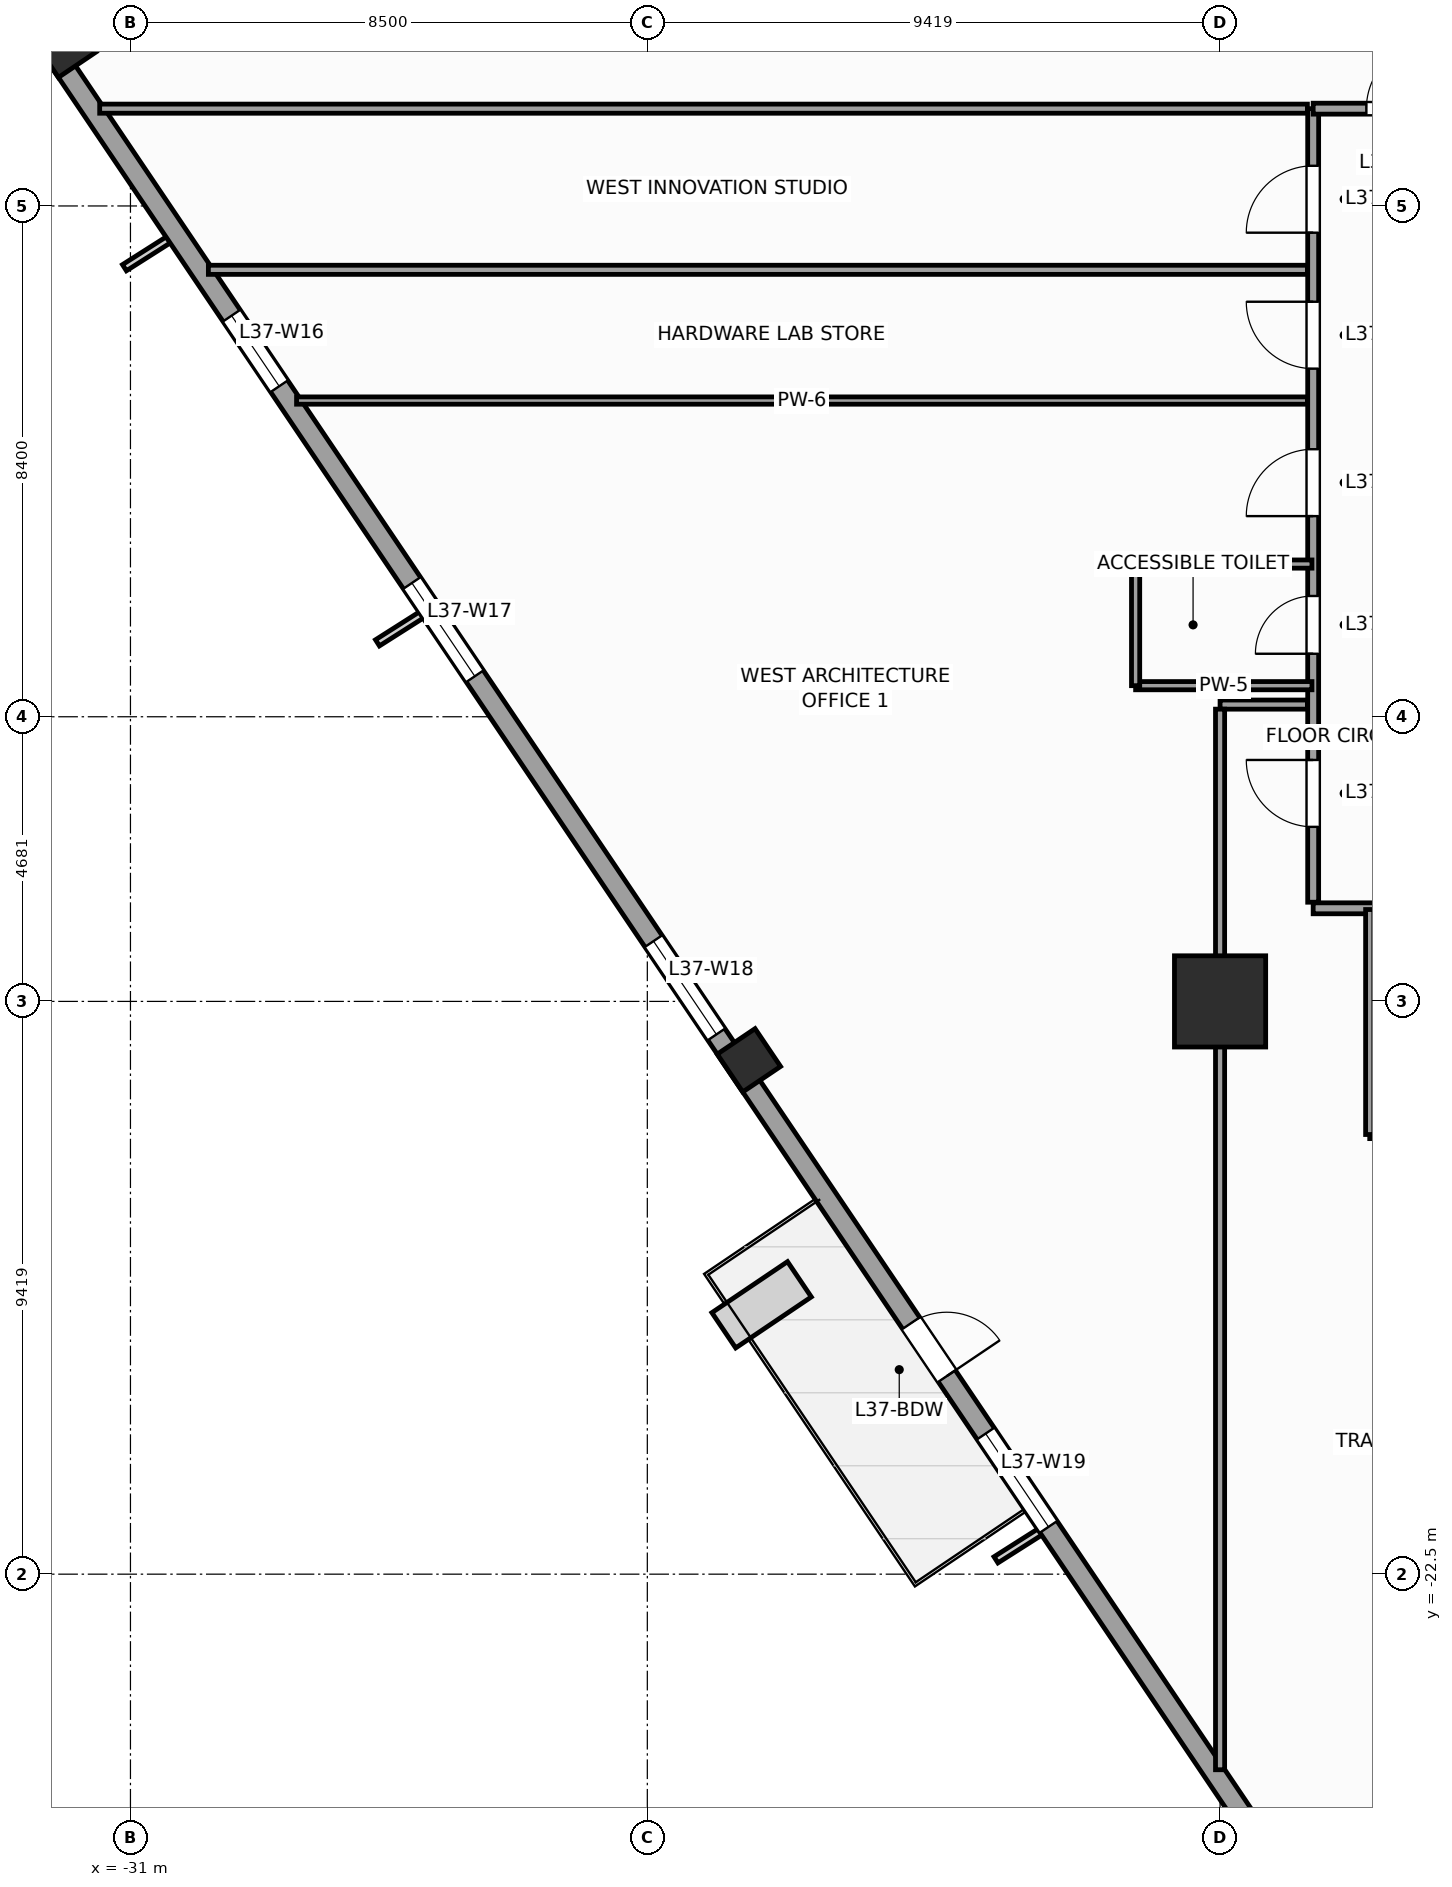
"""IFC4 building model, lengths in metres.
Left out: names, types, materials, properties, quantities, classifications, styles, units other than length and angle.
Written with IfcOpenShell. Run it as: python <this file> out.ifc"""

import sys

from ifc_helpers import new_model, si_unit, direction, frame, frame_2d, origin, origin_2d, place, context, subcontext, project, spatial, rectangle, extrude, source, transform, mapped, element, fill, save


model = new_model("IFC4")
c1 = context("Model", 3, precision=1e-05, world=origin(), true_north=direction((0.0, 1.0)))
c2 = subcontext(c1, "Body", "Model", "MODEL_VIEW")
j1 = project(units=[si_unit("LENGTHUNIT", "METRE"), si_unit("PLANEANGLEUNIT", "RADIAN")], contexts=[c1])
p1 = place(None, origin())
s1 = spatial("IfcSite", under=j1, at=p1, CompositionType="ELEMENT")
p2 = place(p1, origin())
s2 = spatial("IfcBuilding", under=s1, at=p2, CompositionType="ELEMENT")
p3 = place(p2, frame((0.0, 0.0, 156.4)))
s3 = spatial("IfcBuildingStorey", under=s2, at=p3, CompositionType="ELEMENT", Elevation=156.4)
m1 = source(origin(), c2, "Body", "SweptSolid", [
    extrude(rectangle(XDim=1.5, YDim=1.5, at=origin_2d()), origin(), (0.0, 0.0, 1.0), 4.0),
])
p4 = place(p3, frame((-13.081, -13.081, 0.0), z_axis=(0.0, 0.0, 1.0), x_axis=(1.0, 0.0, 0.0)))
e1 = element("IfcColumn", 1, at=p4, inside=s3, PredefinedType="COLUMN", context=c2, shape_type="MappedRepresentation", body=[
    mapped(m1, transform((0.0, 0.0, 0.0), scale=1.0)),
])
m2 = source(origin(), c2, "Body", "SweptSolid", [
    extrude(rectangle(XDim=0.75, YDim=0.75, at=origin_2d()), origin(), (0.0, 0.0, 1.0), 4.0),
])
for number, where, z_axis, x_axis in (
    (2, (-32.083, 2.635, 0.0), (0.0, 0.0, 1.0), (0.829, 0.559, 0.0)),
    (3, (-20.83, -14.05, 0.0), (0.0, 0.0, 1.0), (0.829, 0.559, 0.0)),
):
    element("IfcColumn", number, at=place(p3, frame(where, z_axis=z_axis, x_axis=x_axis)), inside=s3, PredefinedType="COLUMN", context=c2, shape_type="MappedRepresentation", body=[
        mapped(m2, transform((0.0, 0.0, 0.0), scale=1.0)),
    ])
p5 = place(p3, frame((-28.223, 5.486, 0.0), z_axis=(0.0, 0.0, 1.0), x_axis=(-0.82905227345, -0.559171107879, 0.0)))
e4 = element("IfcWall", 4, at=p5, inside=s3, PredefinedType="STANDARD", context=c2, shape_type="SweptSolid", body=[
    extrude(rectangle(XDim=5.17, YDim=0.34, at=frame_2d((2.585, 0.0))), origin(), (0.0, 0.0, 1.0), 3.04),
])
p6 = place(p5, frame((1.885, 0.0, 0.56)))
e5 = element("IfcOpeningElement", 5, at=p6, cuts=e4, PredefinedType="OPENING", context=c2, shape_type="SweptSolid", body=[
    extrude(rectangle(XDim=1.4, YDim=2.4, at=frame_2d((0.7, 1.2))), frame((0.0, 0.18, 0.0), z_axis=(0.0, -1.0, 0.0), x_axis=(1.0, 0.0, 0.0)), (0.0, 0.0, 1.0), 0.36),
])
p7 = place(p3, frame((-32.558, 2.972, 0.0), z_axis=(0.0, 0.0, 1.0), x_axis=(0.559194910251, -0.829036218961, 0.0)))
e6 = element("IfcWall", 6, at=p7, inside=s3, PredefinedType="STANDARD", context=c2, shape_type="SweptSolid", body=[
    extrude(rectangle(XDim=41.34, YDim=0.34, at=frame_2d((20.67, 0.0))), origin(), (0.0, 0.0, 1.0), 3.04),
])
p8 = place(p7, frame((25.745, 0.0, 0.0)))
e7 = element("IfcOpeningElement", 7, at=p8, cuts=e6, PredefinedType="OPENING", context=c2, shape_type="SweptSolid", body=[
    extrude(rectangle(XDim=1.05, YDim=2.25, at=frame_2d((0.525, 1.125))), frame((0.0, 0.18, 0.0), z_axis=(0.0, -1.0, 0.0), x_axis=(1.0, 0.0, 0.0)), (0.0, 0.0, 1.0), 0.36),
])
p9 = place(p7, frame((5.761, 0.0, 0.56)))
e8 = element("IfcOpeningElement", 8, at=p9, cuts=e6, PredefinedType="OPENING", context=c2, shape_type="SweptSolid", body=[
    extrude(rectangle(XDim=1.4, YDim=2.4, at=frame_2d((0.7, 1.2))), frame((0.0, 0.18, 0.0), z_axis=(0.0, -1.0, 0.0), x_axis=(1.0, 0.0, 0.0)), (0.0, 0.0, 1.0), 0.36),
])
p10 = place(p7, frame((11.064, 0.0, 0.61)))
e9 = element("IfcOpeningElement", 9, at=p10, cuts=e6, PredefinedType="OPENING", context=c2, shape_type="SweptSolid", body=[
    extrude(rectangle(XDim=1.85, YDim=2.35, at=frame_2d((0.925, 1.175))), frame((0.0, 0.18, 0.0), z_axis=(0.0, -1.0, 0.0), x_axis=(1.0, 0.0, 0.0)), (0.0, 0.0, 1.0), 0.36),
])
p11 = place(p7, frame((18.168, 0.0, 0.61)))
e10 = element("IfcOpeningElement", 10, at=p11, cuts=e6, PredefinedType="OPENING", context=c2, shape_type="SweptSolid", body=[
    extrude(rectangle(XDim=1.85, YDim=2.35, at=frame_2d((0.925, 1.175))), frame((0.0, 0.18, 0.0), z_axis=(0.0, -1.0, 0.0), x_axis=(1.0, 0.0, 0.0)), (0.0, 0.0, 1.0), 0.36),
])
p12 = place(p7, frame((27.936, 0.0, 0.61)))
e11 = element("IfcOpeningElement", 11, at=p12, cuts=e6, PredefinedType="OPENING", context=c2, shape_type="SweptSolid", body=[
    extrude(rectangle(XDim=1.85, YDim=2.35, at=frame_2d((0.925, 1.175))), frame((0.0, 0.18, 0.0), z_axis=(0.0, -1.0, 0.0), x_axis=(1.0, 0.0, 0.0)), (0.0, 0.0, 1.0), 0.36),
])
p13 = place(p7, frame((35.602, 0.0, 0.56)))
e12 = element("IfcOpeningElement", 12, at=p13, cuts=e6, PredefinedType="OPENING", context=c2, shape_type="SweptSolid", body=[
    extrude(rectangle(XDim=1.4, YDim=2.4, at=frame_2d((0.7, 1.2))), frame((0.0, 0.18, 0.0), z_axis=(0.0, -1.0, 0.0), x_axis=(1.0, 0.0, 0.0)), (0.0, 0.0, 1.0), 0.36),
])
p14 = place(p3, frame((-11.55, -11.55, 0.0), z_axis=(0.0, 0.0, 1.0), x_axis=(1.0, 0.0, 0.0)))
e13 = element("IfcWall", 13, at=p14, inside=s3, PredefinedType="PARTITIONING", context=c2, shape_type="SweptSolid", body=[
    extrude(rectangle(XDim=22.0, YDim=0.18, at=frame_2d((11.0, 0.0))), origin(), (0.0, 0.0, 1.0), 3.74),
])
p15 = place(p14, frame((1.58, 0.0, 0.0)))
e14 = element("IfcOpeningElement", 14, at=p15, cuts=e13, PredefinedType="OPENING", context=c2, shape_type="SweptSolid", body=[
    extrude(rectangle(XDim=0.95, YDim=2.1, at=frame_2d((0.475, 1.05))), frame((0.0, 0.1, 0.0), z_axis=(0.0, -1.0, 0.0), x_axis=(1.0, 0.0, 0.0)), (0.0, 0.0, 1.0), 0.2),
])
p16 = place(p14, frame((6.75, 0.0, 0.0)))
e15 = element("IfcOpeningElement", 15, at=p16, cuts=e13, PredefinedType="OPENING", context=c2, shape_type="SweptSolid", body=[
    extrude(rectangle(XDim=1.1, YDim=2.2, at=frame_2d((0.55, 1.1))), frame((0.0, 0.1, 0.0), z_axis=(0.0, -1.0, 0.0), x_axis=(1.0, 0.0, 0.0)), (0.0, 0.0, 1.0), 0.2),
])
p17 = place(p14, frame((11.25, 0.0, 0.0)))
e16 = element("IfcOpeningElement", 16, at=p17, cuts=e13, PredefinedType="OPENING", context=c2, shape_type="SweptSolid", body=[
    extrude(rectangle(XDim=1.1, YDim=2.2, at=frame_2d((0.55, 1.1))), frame((0.0, 0.1, 0.0), z_axis=(0.0, -1.0, 0.0), x_axis=(1.0, 0.0, 0.0)), (0.0, 0.0, 1.0), 0.2),
])
p18 = place(p14, frame((15.75, 0.0, 0.0)))
e17 = element("IfcOpeningElement", 17, at=p18, cuts=e13, PredefinedType="OPENING", context=c2, shape_type="SweptSolid", body=[
    extrude(rectangle(XDim=1.1, YDim=2.2, at=frame_2d((0.55, 1.1))), frame((0.0, 0.1, 0.0), z_axis=(0.0, -1.0, 0.0), x_axis=(1.0, 0.0, 0.0)), (0.0, 0.0, 1.0), 0.2),
])
p19 = place(p14, frame((19.561, 0.0, 0.0)))
e18 = element("IfcOpeningElement", 18, at=p19, cuts=e13, PredefinedType="OPENING", context=c2, shape_type="SweptSolid", body=[
    extrude(rectangle(XDim=1.1, YDim=2.2, at=frame_2d((0.55, 1.1))), frame((0.0, 0.1, 0.0), z_axis=(0.0, -1.0, 0.0), x_axis=(1.0, 0.0, 0.0)), (0.0, 0.0, 1.0), 0.2),
])
p20 = place(p3, frame((-11.55, -11.45, 0.0), z_axis=(0.0, 0.0, 1.0), x_axis=(0.0, 1.0, 0.0)))
e19 = element("IfcWall", 19, at=p20, inside=s3, PredefinedType="PARTITIONING", context=c2, shape_type="SweptSolid", body=[
    extrude(rectangle(XDim=13.05, YDim=0.18, at=frame_2d((6.525, 0.0))), origin(), (0.0, 0.0, 1.0), 3.74),
])
p21 = place(p20, frame((4.086, 0.0, 0.0)))
e20 = element("IfcOpeningElement", 20, at=p21, cuts=e19, PredefinedType="OPENING", context=c2, shape_type="SweptSolid", body=[
    extrude(rectangle(XDim=0.95, YDim=2.1, at=frame_2d((0.475, 1.05))), frame((0.0, 0.1, 0.0), z_axis=(0.0, -1.0, 0.0), x_axis=(1.0, 0.0, 0.0)), (0.0, 0.0, 1.0), 0.2),
])
p22 = place(p20, frame((11.01, 0.0, 0.0)))
e21 = element("IfcOpeningElement", 21, at=p22, cuts=e19, PredefinedType="OPENING", context=c2, shape_type="SweptSolid", body=[
    extrude(rectangle(XDim=1.1, YDim=2.2, at=frame_2d((0.55, 1.1))), frame((0.0, 0.1, 0.0), z_axis=(0.0, -1.0, 0.0), x_axis=(1.0, 0.0, 0.0)), (0.0, 0.0, 1.0), 0.2),
])
p23 = place(p20, frame((8.775, 0.0, 0.0)))
e22 = element("IfcOpeningElement", 22, at=p23, cuts=e19, PredefinedType="OPENING", context=c2, shape_type="SweptSolid", body=[
    extrude(rectangle(XDim=1.1, YDim=2.2, at=frame_2d((0.55, 1.1))), frame((0.0, 0.1, 0.0), z_axis=(0.0, -1.0, 0.0), x_axis=(1.0, 0.0, 0.0)), (0.0, 0.0, 1.0), 0.2),
])
p24 = place(p20, frame((6.35, 0.0, 0.0)))
e23 = element("IfcOpeningElement", 23, at=p24, cuts=e19, PredefinedType="OPENING", context=c2, shape_type="SweptSolid", body=[
    extrude(rectangle(XDim=1.1, YDim=2.2, at=frame_2d((0.55, 1.1))), frame((0.0, 0.1, 0.0), z_axis=(0.0, -1.0, 0.0), x_axis=(1.0, 0.0, 0.0)), (0.0, 0.0, 1.0), 0.2),
])
p25 = place(p20, frame((1.24, 0.0, 0.0)))
e24 = element("IfcOpeningElement", 24, at=p25, cuts=e19, PredefinedType="OPENING", context=c2, shape_type="SweptSolid", body=[
    extrude(rectangle(XDim=1.1, YDim=2.2, at=frame_2d((0.55, 1.1))), frame((0.0, 0.1, 0.0), z_axis=(0.0, -1.0, 0.0), x_axis=(1.0, 0.0, 0.0)), (0.0, 0.0, 1.0), 0.2),
])
p26 = place(p3, frame((-11.55, 1.6, 0.0), z_axis=(0.0, 0.0, 1.0), x_axis=(1.0, 0.0, 0.0)))
e25 = element("IfcWall", 25, at=p26, inside=s3, PredefinedType="PARTITIONING", context=c2, shape_type="SweptSolid", body=[
    extrude(rectangle(XDim=2.85, YDim=0.18, at=frame_2d((1.425, 0.0))), origin(), (0.0, 0.0, 1.0), 3.74),
])
p27 = place(p26, frame((0.875, 0.0, 0.0)))
e26 = element("IfcOpeningElement", 26, at=p27, cuts=e25, PredefinedType="OPENING", context=c2, shape_type="SweptSolid", body=[
    extrude(rectangle(XDim=1.1, YDim=2.2, at=frame_2d((0.55, 1.1))), frame((0.0, 0.1, 0.0), z_axis=(0.0, -1.0, 0.0), x_axis=(1.0, 0.0, 0.0)), (0.0, 0.0, 1.0), 0.2),
])
p28 = place(p3, frame((-29.719, -1.05, 0.0), z_axis=(0.0, 0.0, 1.0), x_axis=(1.0, 0.0, 0.0)))
e27 = element("IfcWall", 27, at=p28, inside=s3, PredefinedType="PARTITIONING", context=c2, shape_type="SweptSolid", body=[
    extrude(rectangle(XDim=18.073, YDim=0.15, at=frame_2d((9.037, 0.0))), origin(), (0.0, 0.0, 1.0), 3.74),
])
p29 = place(p3, frame((-31.506, 1.6, 0.0), z_axis=(0.0, 0.0, 1.0), x_axis=(1.0, 0.0, 0.0)))
e28 = element("IfcWall", 28, at=p29, inside=s3, PredefinedType="PARTITIONING", context=c2, shape_type="SweptSolid", body=[
    extrude(rectangle(XDim=19.861, YDim=0.15, at=frame_2d((9.931, 0.0))), origin(), (0.0, 0.0, 1.0), 3.74),
])
p30 = place(p3, frame((-11.645, -8.2, 0.0), z_axis=(0.0, 0.0, 1.0), x_axis=(-1.0, 0.0, 0.0)))
e29 = element("IfcWall", 29, at=p30, inside=s3, PredefinedType="PARTITIONING", context=c2, shape_type="SweptSolid", body=[
    extrude(rectangle(XDim=1.436, YDim=0.15, at=frame_2d((0.718, 0.0))), origin(), (0.0, 0.0, 1.0), 3.74),
])
p31 = place(p3, frame((-13.081, -8.275, 0.0), z_axis=(0.0, 0.0, 1.0), x_axis=(0.0, -1.0, 0.0)))
e30 = element("IfcWall", 30, at=p31, inside=s3, PredefinedType="PARTITIONING", context=c2, shape_type="SweptSolid", body=[
    extrude(rectangle(XDim=17.441, YDim=0.15, at=frame_2d((8.721, 0.0))), origin(), (0.0, 0.0, 1.0), 2.84),
])
p32 = place(p3, frame((-28.268, -3.2, 0.0), z_axis=(0.0, 0.0, 1.0), x_axis=(1.0, 0.0, 0.0)))
e31 = element("IfcWall", 31, at=p32, inside=s3, PredefinedType="PARTITIONING", context=c2, shape_type="SweptSolid", body=[
    extrude(rectangle(XDim=16.623, YDim=0.12, at=frame_2d((8.312, 0.0))), origin(), (0.0, 0.0, 1.0), 3.74),
])
for number, where, z_axis, x_axis in (
    (32, (-14.47, -7.889, 0.0), (0.0, 0.0, 1.0), (1.0, 0.0, 0.0)),
    (33, (-14.47, -5.889, 0.0), (0.0, 0.0, 1.0), (1.0, 0.0, 0.0)),
):
    element("IfcWall", number, at=place(p3, frame(where, z_axis=z_axis, x_axis=x_axis)), inside=s3, PredefinedType="PARTITIONING", context=c2, shape_type="SweptSolid", body=[
        extrude(rectangle(XDim=2.9, YDim=0.135, at=frame_2d((1.45, 0.0))), origin(), (0.0, 0.0, 1.0), 3.74),
    ])
p33 = place(p3, frame((-14.47, -7.889, 0.0), z_axis=(0.0, 0.0, 1.0), x_axis=(0.0, 1.0, 0.0)))
e34 = element("IfcWall", 34, at=p33, inside=s3, PredefinedType="PARTITIONING", context=c2, shape_type="SweptSolid", body=[
    extrude(rectangle(XDim=2.0, YDim=0.135, at=frame_2d((1.0, 0.0))), origin(), (0.0, 0.0, 1.0), 3.74),
])
p34 = place(p3, frame((-10.62, -15.27, 0.0), z_axis=(0.0, 0.0, 1.0), x_axis=(1.0, 0.0, 0.0)))
e35 = element("IfcWall", 35, at=p34, inside=s3, PredefinedType="PARTITIONING", context=c2, shape_type="SweptSolid", body=[
    extrude(rectangle(XDim=2.25, YDim=0.135, at=frame_2d((1.125, 0.0))), origin(), (0.0, 0.0, 1.0), 3.74),
])
p35 = place(p3, frame((-10.62, -15.27, 0.0), z_axis=(0.0, 0.0, 1.0), x_axis=(0.0, 1.0, 0.0)))
e36 = element("IfcWall", 36, at=p35, inside=s3, PredefinedType="PARTITIONING", context=c2, shape_type="SweptSolid", body=[
    extrude(rectangle(XDim=3.7, YDim=0.135, at=frame_2d((1.85, 0.0))), origin(), (0.0, 0.0, 1.0), 3.74),
])
m3 = source(origin(), c2, "Body", "SweptSolid", [
    extrude(rectangle(XDim=1.05, YDim=2.25, at=frame_2d((0.525, 1.125))), frame((0.0, 0.025, 0.0), z_axis=(0.0, -1.0, 0.0), x_axis=(1.0, 0.0, 0.0)), (0.0, 0.0, 1.0), 0.05),
])
p36 = place(p8, origin())
e37 = element("IfcDoor", 37, at=p36, inside=s3, OperationType="SINGLE_SWING_RIGHT", PredefinedType="DOOR", context=c2, shape_type="MappedRepresentation", body=[
    mapped(m3, transform((0.0, 0.0, 0.0), scale=1.0)),
])
fill(e7, e37)
m4 = source(origin(), c2, "Body", "SweptSolid", [
    extrude(rectangle(XDim=1.4, YDim=2.4, at=frame_2d((0.7, 1.2))), frame((0.0, 0.03, 0.0), z_axis=(0.0, -1.0, 0.0), x_axis=(1.0, 0.0, 0.0)), (0.0, 0.0, 1.0), 0.06),
])
p37 = place(p9, origin())
e38 = element("IfcWindow", 38, at=p37, inside=s3, PartitioningType="SINGLE_PANEL", PredefinedType="WINDOW", context=c2, shape_type="MappedRepresentation", body=[
    mapped(m4, transform((0.0, 0.0, 0.0), scale=1.0)),
])
fill(e8, e38)
m5 = source(origin(), c2, "Body", "SweptSolid", [
    extrude(rectangle(XDim=1.85, YDim=2.35, at=frame_2d((0.925, 1.175))), frame((0.0, 0.03, 0.0), z_axis=(0.0, -1.0, 0.0), x_axis=(1.0, 0.0, 0.0)), (0.0, 0.0, 1.0), 0.06),
])
p38 = place(p10, origin())
e39 = element("IfcWindow", 39, at=p38, inside=s3, PartitioningType="SINGLE_PANEL", PredefinedType="WINDOW", context=c2, shape_type="MappedRepresentation", body=[
    mapped(m5, transform((0.0, 0.0, 0.0), scale=1.0)),
])
fill(e9, e39)
p39 = place(p11, origin())
e40 = element("IfcWindow", 40, at=p39, inside=s3, PartitioningType="SINGLE_PANEL", PredefinedType="WINDOW", context=c2, shape_type="MappedRepresentation", body=[
    mapped(m5, transform((0.0, 0.0, 0.0), scale=1.0)),
])
fill(e10, e40)
p40 = place(p12, origin())
e41 = element("IfcWindow", 41, at=p40, inside=s3, PartitioningType="SINGLE_PANEL", PredefinedType="WINDOW", context=c2, shape_type="MappedRepresentation", body=[
    mapped(m5, transform((0.0, 0.0, 0.0), scale=1.0)),
])
fill(e11, e41)
m6 = source(origin(), c2, "Body", "SweptSolid", [
    extrude(rectangle(XDim=0.95, YDim=2.1, at=frame_2d((0.475, 1.05))), frame((0.0, 0.025, 0.0), z_axis=(0.0, -1.0, 0.0), x_axis=(1.0, 0.0, 0.0)), (0.0, 0.0, 1.0), 0.05),
])
p41 = place(p21, origin())
e42 = element("IfcDoor", 42, at=p41, inside=s3, OperationType="SINGLE_SWING_LEFT", PredefinedType="DOOR", context=c2, shape_type="MappedRepresentation", body=[
    mapped(m6, transform((0.0, 0.0, 0.0), scale=1.0)),
])
fill(e20, e42)
m7 = source(origin(), c2, "Body", "SweptSolid", [
    extrude(rectangle(XDim=1.1, YDim=2.2, at=frame_2d((0.55, 1.1))), frame((0.0, 0.025, 0.0), z_axis=(0.0, -1.0, 0.0), x_axis=(1.0, 0.0, 0.0)), (0.0, 0.0, 1.0), 0.05),
])
p42 = place(p22, origin())
e43 = element("IfcDoor", 43, at=p42, inside=s3, OperationType="SINGLE_SWING_LEFT", PredefinedType="DOOR", context=c2, shape_type="MappedRepresentation", body=[
    mapped(m7, transform((0.0, 0.0, 0.0), scale=1.0)),
])
fill(e21, e43)
p43 = place(p27, origin())
e44 = element("IfcDoor", 44, at=p43, inside=s3, OperationType="SINGLE_SWING_RIGHT", PredefinedType="DOOR", context=c2, shape_type="MappedRepresentation", body=[
    mapped(m7, transform((0.0, 0.0, 0.0), scale=1.0)),
])
fill(e26, e44)
p44 = place(p23, origin())
e45 = element("IfcDoor", 45, at=p44, inside=s3, OperationType="SINGLE_SWING_RIGHT", PredefinedType="DOOR", context=c2, shape_type="MappedRepresentation", body=[
    mapped(m7, transform((0.0, 0.0, 0.0), scale=1.0)),
])
fill(e22, e45)
p45 = place(p24, origin())
e46 = element("IfcDoor", 46, at=p45, inside=s3, OperationType="SINGLE_SWING_LEFT", PredefinedType="DOOR", context=c2, shape_type="MappedRepresentation", body=[
    mapped(m7, transform((0.0, 0.0, 0.0), scale=1.0)),
])
fill(e23, e46)
p46 = place(p25, origin())
e47 = element("IfcDoor", 47, at=p46, inside=s3, OperationType="SINGLE_SWING_RIGHT", PredefinedType="DOOR", context=c2, shape_type="MappedRepresentation", body=[
    mapped(m7, transform((0.0, 0.0, 0.0), scale=1.0)),
])
fill(e24, e47)
save(model, sys.argv[1])
